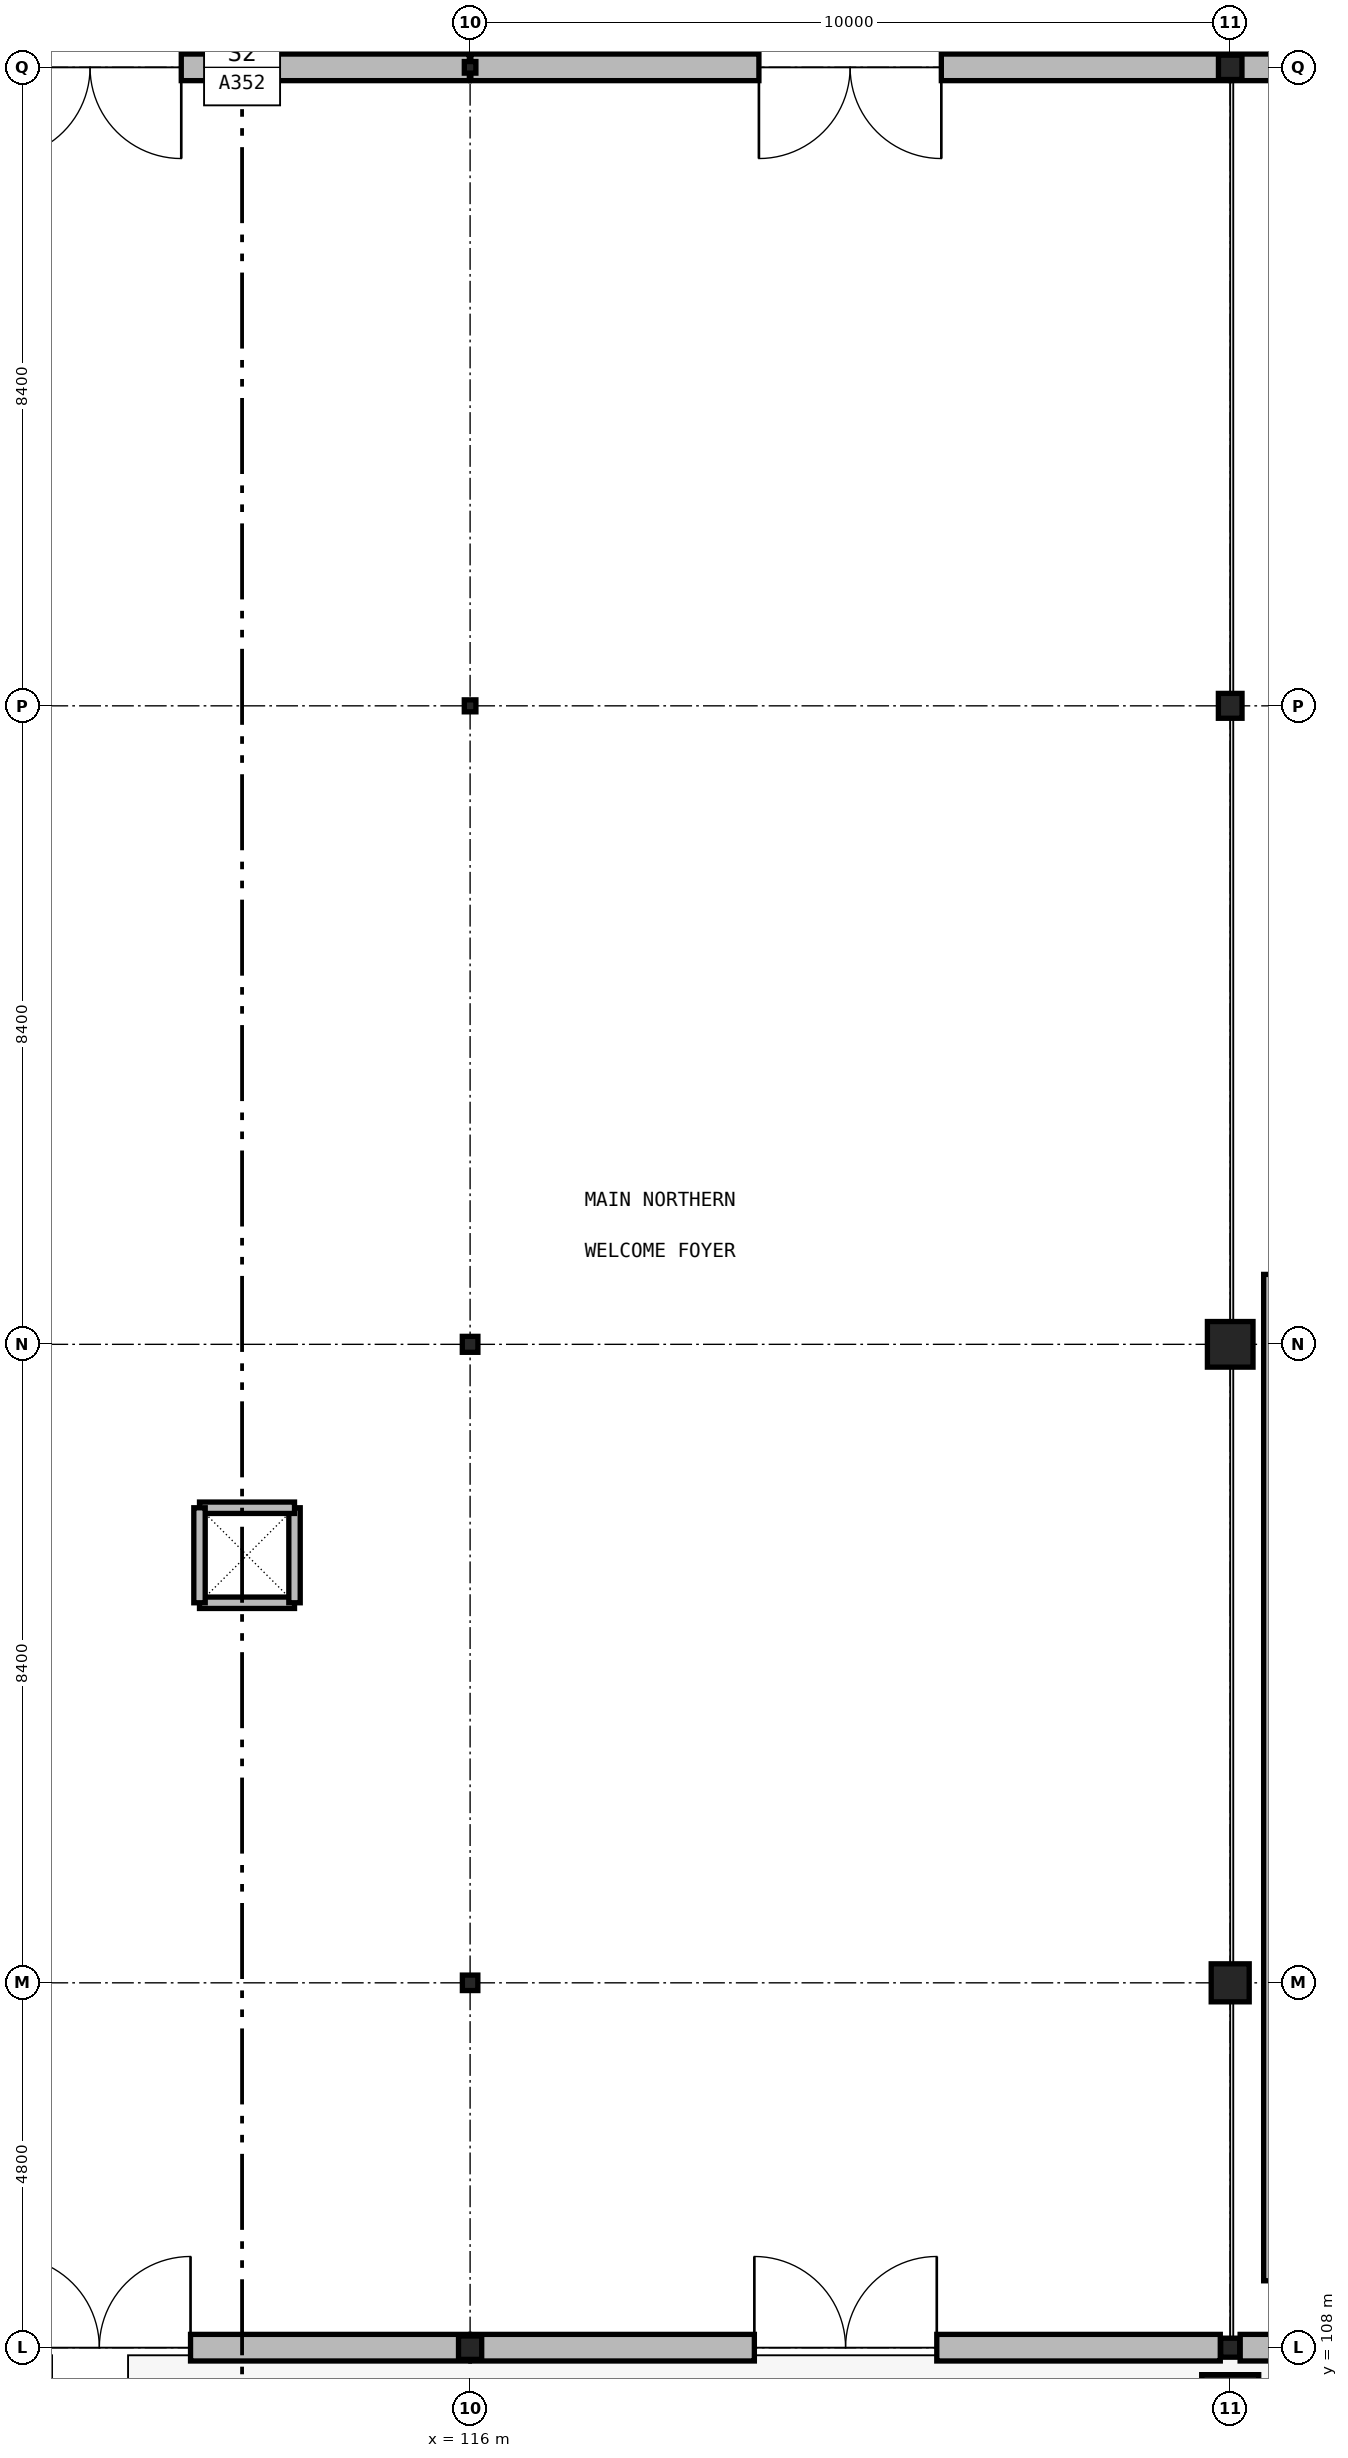
"""IFC4 building model, lengths in metres.
Left out: names, types, materials, properties, quantities, classifications, styles, units other than length and angle.
Written with IfcOpenShell. Run it as: python <this file> out.ifc"""

import sys

from ifc_helpers import new_model, si_unit, direction, frame, frame_2d, origin, origin_2d_with_axis, place, context, subcontext, project, spatial, rectangle, hollow_rectangle, i_section, extrude, element, fill, save


model = new_model("IFC4")
c1 = context("Model", 3, precision=1e-05, world=origin(), true_north=direction((0.0, 1.0)))
c2 = subcontext(c1, "Body", "Model", "MODEL_VIEW")
j1 = project(units=[si_unit("LENGTHUNIT", "METRE"), si_unit("PLANEANGLEUNIT", "RADIAN")], contexts=[c1])
p1 = place(None, origin())
s1 = spatial("IfcSite", under=j1, at=p1, CompositionType="ELEMENT")
p2 = place(p1, origin())
s2 = spatial("IfcBuilding", under=s1, at=p2, CompositionType="ELEMENT")
p3 = place(p2, origin())
s3 = spatial("IfcBuildingStorey", under=s2, at=p3, CompositionType="ELEMENT", Elevation=0.0)
p4 = place(p3, frame((126.0, 107.42, 0.0), z_axis=(0.0, 0.0, 1.0), x_axis=(1.0, 0.0, 0.0)))
e1 = element("IfcColumn", 1, at=p4, inside=s3, PredefinedType="PILASTER", context=c2, shape_type="SweptSolid", body=[
    extrude(rectangle(XDim=0.75, YDim=0.45, at=origin_2d_with_axis()), origin(), (0.0, 0.0, 1.0), 4.5),
])
p5 = place(p3, frame((116.0, 108.0, -0.28), z_axis=(0.0, 0.0, 1.0), x_axis=(1.0, 0.0, 0.0)))
e2 = element("IfcColumn", 2, at=p5, inside=s3, PredefinedType="COLUMN", context=c2, shape_type="SweptSolid", body=[
    extrude(i_section(OverallWidth=0.305, OverallDepth=0.308, WebThickness=0.01, FlangeThickness=0.015, FilletRadius=0.017, at=origin_2d_with_axis()), origin(), (0.0, 0.0, 1.0), 4.78),
])
p6 = place(p3, frame((116.0, 112.8, -0.28), z_axis=(0.0, 0.0, 1.0), x_axis=(1.0, 0.0, 0.0)))
e3 = element("IfcColumn", 3, at=p6, inside=s3, PredefinedType="COLUMN", context=c2, shape_type="SweptSolid", body=[
    extrude(i_section(OverallWidth=0.203, OverallDepth=0.203, WebThickness=0.007, FlangeThickness=0.011, FilletRadius=0.011, at=origin_2d_with_axis()), origin(), (0.0, 0.0, 1.0), 4.78),
])
p7 = place(p3, frame((116.0, 121.2, 0.0), z_axis=(0.0, 0.0, 1.0), x_axis=(1.0, 0.0, 0.0)))
e4 = element("IfcColumn", 4, at=p7, inside=s3, PredefinedType="COLUMN", context=c2, shape_type="SweptSolid", body=[
    extrude(i_section(OverallWidth=0.205, OverallDepth=0.21, WebThickness=0.009, FlangeThickness=0.014, FilletRadius=0.011, at=origin_2d_with_axis()), origin(), (0.0, 0.0, 1.0), 4.5),
])
p8 = place(p3, frame((116.0, 129.6, 0.0), z_axis=(0.0, 0.0, 1.0), x_axis=(1.0, 0.0, 0.0)))
e5 = element("IfcColumn", 5, at=p8, inside=s3, PredefinedType="COLUMN", context=c2, shape_type="SweptSolid", body=[
    extrude(i_section(OverallWidth=0.153, OverallDepth=0.158, WebThickness=0.007, FlangeThickness=0.01, FilletRadius=0.009, at=origin_2d_with_axis()), origin(), (0.0, 0.0, 1.0), 4.5),
])
p9 = place(p3, frame((116.0, 138.0, 0.0), z_axis=(0.0, 0.0, 1.0), x_axis=(1.0, 0.0, 0.0)))
e6 = element("IfcColumn", 6, at=p9, inside=s3, PredefinedType="COLUMN", context=c2, shape_type="SweptSolid", body=[
    extrude(i_section(OverallWidth=0.152, OverallDepth=0.152, WebThickness=0.006, FlangeThickness=0.007, FilletRadius=0.009, at=origin_2d_with_axis()), origin(), (0.0, 0.0, 1.0), 4.5),
])
p10 = place(p3, frame((126.0, 108.0, -0.28), z_axis=(0.0, 0.0, 1.0), x_axis=(1.0, 0.0, 0.0)))
e7 = element("IfcColumn", 7, at=p10, inside=s3, PredefinedType="COLUMN", context=c2, shape_type="SweptSolid", body=[
    extrude(hollow_rectangle(XDim=0.25, YDim=0.25, WallThickness=0.009, InnerFilletRadius=0.009, OuterFilletRadius=0.018, at=origin_2d_with_axis()), origin(), (0.0, 0.0, 1.0), 4.78),
])
p11 = place(p3, frame((126.0, 112.8, -0.28), z_axis=(0.0, 0.0, 1.0), x_axis=(1.0, 0.0, 0.0)))
e8 = element("IfcColumn", 8, at=p11, inside=s3, PredefinedType="COLUMN", context=c2, shape_type="SweptSolid", body=[
    extrude(rectangle(XDim=0.5, YDim=0.5, at=origin_2d_with_axis()), origin(), (0.0, 0.0, 1.0), 4.78),
])
p12 = place(p3, frame((126.0, 121.2, 0.0), z_axis=(0.0, 0.0, 1.0), x_axis=(1.0, 0.0, 0.0)))
e9 = element("IfcColumn", 9, at=p12, inside=s3, PredefinedType="COLUMN", context=c2, shape_type="SweptSolid", body=[
    extrude(rectangle(XDim=0.6, YDim=0.6, at=origin_2d_with_axis()), origin(), (0.0, 0.0, 1.0), 4.5),
])
p13 = place(p3, frame((126.0, 129.6, 0.0), z_axis=(0.0, 0.0, 1.0), x_axis=(1.0, 0.0, 0.0)))
e10 = element("IfcColumn", 10, at=p13, inside=s3, PredefinedType="COLUMN", context=c2, shape_type="SweptSolid", body=[
    extrude(i_section(OverallWidth=0.311, OverallDepth=0.327, WebThickness=0.016, FlangeThickness=0.025, FilletRadius=0.017, at=origin_2d_with_axis()), origin(), (0.0, 0.0, 1.0), 4.5),
])
p14 = place(p3, frame((126.0, 138.0, 0.0), z_axis=(0.0, 0.0, 1.0), x_axis=(1.0, 0.0, 0.0)))
e11 = element("IfcColumn", 11, at=p14, inside=s3, PredefinedType="COLUMN", context=c2, shape_type="SweptSolid", body=[
    extrude(i_section(OverallWidth=0.309, OverallDepth=0.321, WebThickness=0.014, FlangeThickness=0.022, FilletRadius=0.017, at=origin_2d_with_axis()), origin(), (0.0, 0.0, 1.0), 4.5),
])
p15 = place(p3, frame((106.254, 108.0, 0.0), z_axis=(0.0, 0.0, 1.0), x_axis=(1.0, 0.0, 0.0)))
e12 = element("IfcWall", 12, at=p15, inside=s3, PredefinedType="SOLIDWALL", context=c2, shape_type="SweptSolid", body=[
    extrude(rectangle(XDim=9.736, YDim=0.35, at=frame_2d((4.868, 0.0), x_axis=(1.0, 0.0))), origin(), (0.0, 0.0, 1.0), 3.88),
])
p16 = place(p15, frame((3.668, 0.0, 0.0)))
e13 = element("IfcOpeningElement", 13, at=p16, cuts=e12, PredefinedType="OPENING", context=c2, shape_type="SweptSolid", body=[
    extrude(rectangle(XDim=2.4, YDim=2.8, at=frame_2d((1.2, 1.4), x_axis=(1.0, 0.0))), frame((0.0, 0.185, 0.0), z_axis=(0.0, -1.0, 0.0), x_axis=(1.0, 0.0, 0.0)), (0.0, 0.0, 1.0), 0.37),
])
p17 = place(p3, frame((115.99, 138.0, 0.0), z_axis=(0.0, 0.0, 1.0), x_axis=(-1.0, 0.0, 0.0)))
e14 = element("IfcWall", 14, at=p17, inside=s3, PredefinedType="SOLIDWALL", context=c2, shape_type="SweptSolid", body=[
    extrude(rectangle(XDim=9.98, YDim=0.35, at=frame_2d((4.99, 0.0), x_axis=(1.0, 0.0))), origin(), (0.0, 0.0, 1.0), 3.88),
])
p18 = place(p17, frame((3.79, 0.0, 0.0)))
e15 = element("IfcOpeningElement", 15, at=p18, cuts=e14, PredefinedType="OPENING", context=c2, shape_type="SweptSolid", body=[
    extrude(rectangle(XDim=2.4, YDim=2.8, at=frame_2d((1.2, 1.4), x_axis=(1.0, 0.0))), frame((0.0, 0.185, 0.0), z_axis=(0.0, -1.0, 0.0), x_axis=(1.0, 0.0, 0.0)), (0.0, 0.0, 1.0), 0.37),
])
p19 = place(p3, frame((116.01, 108.0, 0.0), z_axis=(0.0, 0.0, 1.0), x_axis=(1.0, 0.0, 0.0)))
e16 = element("IfcWall", 16, at=p19, inside=s3, PredefinedType="SOLIDWALL", context=c2, shape_type="SweptSolid", body=[
    extrude(rectangle(XDim=9.859, YDim=0.35, at=frame_2d((4.93, 0.0), x_axis=(1.0, 0.0))), origin(), (0.0, 0.0, 1.0), 3.88),
])
p20 = place(p19, frame((3.73, 0.0, 0.0)))
e17 = element("IfcOpeningElement", 17, at=p20, cuts=e16, PredefinedType="OPENING", context=c2, shape_type="SweptSolid", body=[
    extrude(rectangle(XDim=2.4, YDim=2.8, at=frame_2d((1.2, 1.4), x_axis=(1.0, 0.0))), frame((0.0, 0.185, 0.0), z_axis=(0.0, -1.0, 0.0), x_axis=(1.0, 0.0, 0.0)), (0.0, 0.0, 1.0), 0.37),
])
p21 = place(p3, frame((125.989, 138.0, 0.0), z_axis=(0.0, 0.0, 1.0), x_axis=(-1.0, 0.0, 0.0)))
e18 = element("IfcWall", 18, at=p21, inside=s3, PredefinedType="SOLIDWALL", context=c2, shape_type="SweptSolid", body=[
    extrude(rectangle(XDim=9.979, YDim=0.35, at=frame_2d((4.99, 0.0), x_axis=(1.0, 0.0))), origin(), (0.0, 0.0, 1.0), 3.88),
])
p22 = place(p21, frame((3.79, 0.0, 0.0)))
e19 = element("IfcOpeningElement", 19, at=p22, cuts=e18, PredefinedType="OPENING", context=c2, shape_type="SweptSolid", body=[
    extrude(rectangle(XDim=2.4, YDim=2.8, at=frame_2d((1.2, 1.4), x_axis=(1.0, 0.0))), frame((0.0, 0.185, 0.0), z_axis=(0.0, -1.0, 0.0), x_axis=(1.0, 0.0, 0.0)), (0.0, 0.0, 1.0), 0.37),
])
p23 = place(p3, frame((126.131, 108.0, 0.0), z_axis=(0.0, 0.0, 1.0), x_axis=(1.0, 0.0, 0.0)))
e20 = element("IfcWall", 20, at=p23, inside=s3, PredefinedType="SOLIDWALL", context=c2, shape_type="SweptSolid", body=[
    extrude(rectangle(XDim=9.859, YDim=0.35, at=frame_2d((4.93, 0.0), x_axis=(1.0, 0.0))), origin(), (0.0, 0.0, 1.0), 3.88),
])
p24 = place(p23, frame((3.73, 0.0, 0.0)))
e21 = element("IfcOpeningElement", 21, at=p24, cuts=e20, PredefinedType="OPENING", context=c2, shape_type="SweptSolid", body=[
    extrude(rectangle(XDim=2.4, YDim=2.8, at=frame_2d((1.2, 1.4), x_axis=(1.0, 0.0))), frame((0.0, 0.185, 0.0), z_axis=(0.0, -1.0, 0.0), x_axis=(1.0, 0.0, 0.0)), (0.0, 0.0, 1.0), 0.37),
])
p25 = place(p3, frame((127.25, 138.0, 0.0), z_axis=(0.0, 0.0, 1.0), x_axis=(-1.0, 0.0, 0.0)))
e22 = element("IfcWall", 22, at=p25, inside=s3, PredefinedType="SOLIDWALL", context=c2, shape_type="SweptSolid", body=[
    extrude(rectangle(XDim=1.239, YDim=0.35, at=frame_2d((0.62, 0.0), x_axis=(1.0, 0.0))), origin(), (0.0, 0.0, 1.0), 3.88),
])
for number, where, z_axis, x_axis in (
    (23, (112.44, 117.8, 0.0), (0.0, 0.0, 1.0), (1.0, 0.0, 0.0)),
    (24, (113.69, 117.8, 0.0), (0.0, 0.0, 1.0), (0.0, 1.0, 0.0)),
    (25, (113.69, 119.05, 0.0), (0.0, 0.0, 1.0), (-1.0, 0.0, 0.0)),
    (26, (112.44, 119.05, 0.0), (0.0, 0.0, 1.0), (0.0, -1.0, 0.0)),
):
    element("IfcWall", number, at=place(p3, frame(where, z_axis=z_axis, x_axis=x_axis)), inside=s3, PredefinedType="PARTITIONING", context=c2, shape_type="SweptSolid", body=[
        extrude(rectangle(XDim=1.25, YDim=0.15, at=frame_2d((0.625, 0.0), x_axis=(1.0, 0.0))), origin(), (0.0, 0.0, 1.0), 3.76),
    ])
p26 = place(p3, frame((126.5, 122.12, 0.0), z_axis=(0.0, 0.0, 1.0), x_axis=(0.0, -1.0, 0.0)))
e27 = element("IfcWall", 27, at=p26, inside=s3, PredefinedType="PARTITIONING", context=c2, shape_type="SweptSolid", body=[
    extrude(rectangle(XDim=13.24, YDim=0.12, at=frame_2d((6.62, 0.0), x_axis=(1.0, 0.0))), origin(), (0.0, 0.0, 1.0), 3.62),
])
p27 = place(p16, origin())
e28 = element("IfcDoor", 28, at=p27, inside=s3, OperationType="DOUBLE_SWING_LEFT", PredefinedType="DOOR", context=c2, shape_type="SweptSolid", body=[
    extrude(rectangle(XDim=2.4, YDim=2.8, at=frame_2d((1.2, 1.4), x_axis=(1.0, 0.0))), frame((0.0, 0.025, 0.0), z_axis=(0.0, -1.0, 0.0), x_axis=(1.0, 0.0, 0.0)), (0.0, 0.0, 1.0), 0.05),
])
fill(e13, e28)
p28 = place(p18, origin())
e29 = element("IfcDoor", 29, at=p28, inside=s3, OperationType="DOUBLE_SWING_LEFT", PredefinedType="DOOR", context=c2, shape_type="SweptSolid", body=[
    extrude(rectangle(XDim=2.4, YDim=2.8, at=frame_2d((1.2, 1.4), x_axis=(1.0, 0.0))), frame((0.0, 0.025, 0.0), z_axis=(0.0, -1.0, 0.0), x_axis=(1.0, 0.0, 0.0)), (0.0, 0.0, 1.0), 0.05),
])
fill(e15, e29)
p29 = place(p20, origin())
e30 = element("IfcDoor", 30, at=p29, inside=s3, OperationType="DOUBLE_SWING_LEFT", PredefinedType="DOOR", context=c2, shape_type="SweptSolid", body=[
    extrude(rectangle(XDim=2.4, YDim=2.8, at=frame_2d((1.2, 1.4), x_axis=(1.0, 0.0))), frame((0.0, 0.025, 0.0), z_axis=(0.0, -1.0, 0.0), x_axis=(1.0, 0.0, 0.0)), (0.0, 0.0, 1.0), 0.05),
])
fill(e17, e30)
p30 = place(p22, origin())
e31 = element("IfcDoor", 31, at=p30, inside=s3, OperationType="DOUBLE_SWING_LEFT", PredefinedType="DOOR", context=c2, shape_type="SweptSolid", body=[
    extrude(rectangle(XDim=2.4, YDim=2.8, at=frame_2d((1.2, 1.4), x_axis=(1.0, 0.0))), frame((0.0, 0.025, 0.0), z_axis=(0.0, -1.0, 0.0), x_axis=(1.0, 0.0, 0.0)), (0.0, 0.0, 1.0), 0.05),
])
fill(e19, e31)
save(model, sys.argv[1])
